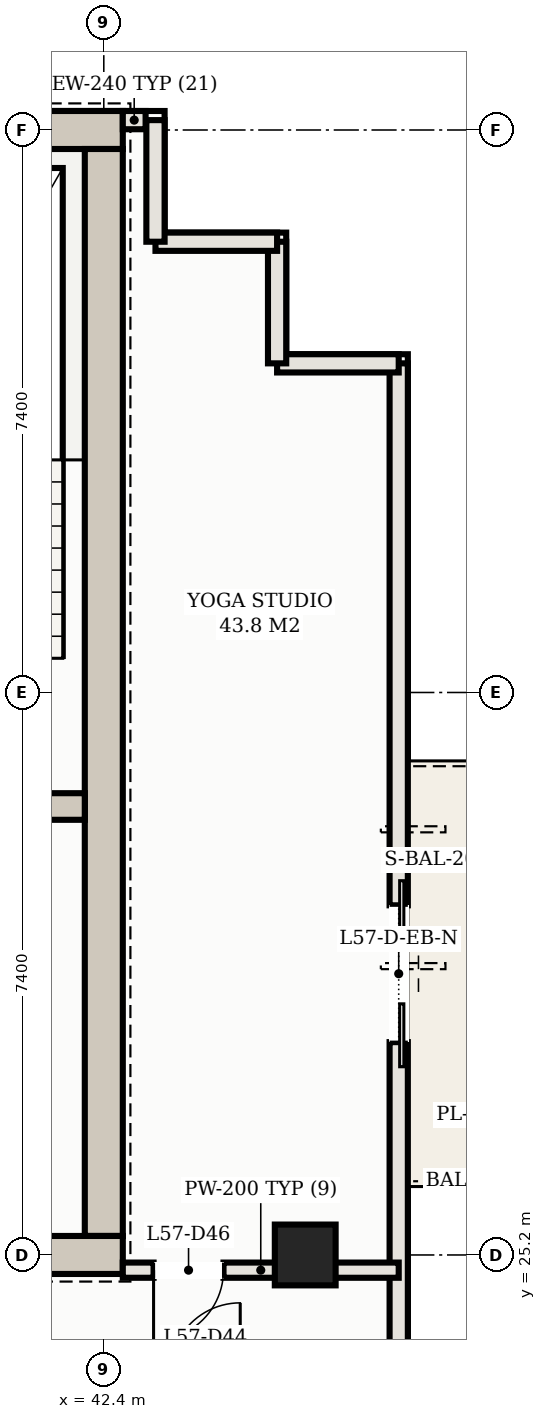
"""IFC4 building model, lengths in metres.
Left out: names, types, materials, properties, quantities, classifications, styles, units other than length and angle.
Written with IfcOpenShell. Run it as: python <this file> out.ifc"""

import sys

from ifc_helpers import new_model, si_unit, direction, frame, frame_2d, origin, origin_2d, place, context, subcontext, project, spatial, rectangle, hollow_rectangle, extrude, element, fill, save


model = new_model("IFC4")
c1 = context("Model", 3, precision=1e-05, world=origin(), true_north=direction((0.0, 1.0)))
c2 = subcontext(c1, "Body", "Model", "MODEL_VIEW")
j1 = project(units=[si_unit("LENGTHUNIT", "METRE"), si_unit("PLANEANGLEUNIT", "RADIAN")], contexts=[c1])
p1 = place(None, origin())
s1 = spatial("IfcSite", under=j1, at=p1, CompositionType="ELEMENT")
p2 = place(p1, origin())
s2 = spatial("IfcBuilding", under=s1, at=p2, CompositionType="ELEMENT")
p3 = place(p2, frame((0.0, 0.0, 209.9)))
s3 = spatial("IfcBuildingStorey", under=s2, at=p3, CompositionType="ELEMENT", Elevation=209.9)
p4 = place(p3, frame((10.35, 40.0, 0.0), z_axis=(0.0, 0.0, 1.0), x_axis=(1.0, 0.0, 0.0)))
e1 = element("IfcWall", 1, at=p4, inside=s3, PredefinedType="SHEAR", context=c2, shape_type="SweptSolid", body=[
    extrude(rectangle(XDim=32.3, YDim=0.5, at=frame_2d((16.15, 0.0))), origin(), (0.0, 0.0, 1.0), 3.11),
])
p5 = place(p3, frame((42.4, 25.45, 0.0), z_axis=(0.0, 0.0, 1.0), x_axis=(0.0, 1.0, 0.0)))
e2 = element("IfcWall", 2, at=p5, inside=s3, PredefinedType="SHEAR", context=c2, shape_type="SweptSolid", body=[
    extrude(rectangle(XDim=14.3, YDim=0.5, at=frame_2d((7.15, 0.0))), origin(), (0.0, 0.0, 1.0), 3.11),
])
p6 = place(p3, frame((34.6, 25.2, 0.0), z_axis=(0.0, 0.0, 1.0), x_axis=(1.0, 0.0, 0.0)))
e3 = element("IfcWall", 3, at=p6, inside=s3, PredefinedType="SHEAR", context=c2, shape_type="SweptSolid", body=[
    extrude(rectangle(XDim=8.05, YDim=0.5, at=frame_2d((4.025, 0.0))), origin(), (0.0, 0.0, 1.0), 3.11),
])
p7 = place(p6, frame((0.65, 0.0, 0.0)))
e4 = element("IfcOpeningElement", 4, at=p7, cuts=e3, PredefinedType="OPENING", context=c2, shape_type="SweptSolid", body=[
    extrude(rectangle(XDim=1.25, YDim=2.2, at=frame_2d((0.625, 1.1))), frame((0.0, 0.26, 0.0), z_axis=(0.0, -1.0, 0.0), x_axis=(1.0, 0.0, 0.0)), (0.0, 0.0, 1.0), 0.52),
])
p8 = place(p3, frame((38.075, 31.1, 0.0), z_axis=(0.0, 0.0, 1.0), x_axis=(1.0, 0.0, 0.0)))
e5 = element("IfcWall", 5, at=p8, inside=s3, PredefinedType="SHEAR", context=c2, shape_type="SweptSolid", body=[
    extrude(rectangle(XDim=4.075, YDim=0.35, at=frame_2d((2.038, 0.0))), origin(), (0.0, 0.0, 1.0), 3.11),
])
p9 = place(p3, frame((45.05, 25.2, 0.0), z_axis=(0.0, 0.0, 1.0), x_axis=(1.0, 0.0, 0.0)))
e6 = element("IfcColumn", 6, at=p9, inside=s3, PredefinedType="COLUMN", context=c2, shape_type="SweptSolid", body=[
    extrude(hollow_rectangle(XDim=0.8, YDim=0.8, WallThickness=0.028, at=origin_2d()), origin(), (0.0, 0.0, 1.0), 3.3),
])
p10 = place(p3, frame((46.28, 10.52, 0.0), z_axis=(0.0, 0.0, 1.0), x_axis=(0.0, 1.0, 0.0)))
e7 = element("IfcWall", 7, at=p10, inside=s3, PredefinedType="SOLIDWALL", context=c2, shape_type="SweptSolid", body=[
    extrude(rectangle(XDim=26.41, YDim=0.24, at=frame_2d((13.205, 0.0))), origin(), (0.0, 0.0, 1.0), 3.11),
])
p11 = place(p10, frame((17.48, 0.0, 0.0)))
e8 = element("IfcOpeningElement", 8, at=p11, cuts=e7, PredefinedType="OPENING", context=c2, shape_type="SweptSolid", body=[
    extrude(rectangle(XDim=1.8, YDim=2.2, at=frame_2d((0.9, 1.1))), frame((0.0, 0.13, 0.0), z_axis=(0.0, -1.0, 0.0), x_axis=(1.0, 0.0, 0.0)), (0.0, 0.0, 1.0), 0.26),
])
for number, where, z_axis, x_axis in (
    (9, (46.28, 36.93, 0.0), (0.0, 0.0, 1.0), (-1.0, 0.0, 0.0)),
    (10, (44.68, 36.93, 0.0), (0.0, 0.0, 1.0), (0.0, 1.0, 0.0)),
):
    element("IfcWall", number, at=place(p3, frame(where, z_axis=z_axis, x_axis=x_axis)), inside=s3, PredefinedType="SOLIDWALL", context=c2, shape_type="SweptSolid", body=[
        extrude(rectangle(XDim=1.6, YDim=0.24, at=frame_2d((0.8, 0.0))), origin(), (0.0, 0.0, 1.0), 3.11),
    ])
for number, where, z_axis, x_axis in (
    (11, (44.68, 38.53, 0.0), (0.0, 0.0, 1.0), (-1.0, 0.0, 0.0)),
    (12, (43.08, 38.53, 0.0), (0.0, 0.0, 1.0), (0.0, 1.0, 0.0)),
):
    element("IfcWall", number, at=place(p3, frame(where, z_axis=z_axis, x_axis=x_axis)), inside=s3, PredefinedType="SOLIDWALL", context=c2, shape_type="SweptSolid", body=[
        extrude(rectangle(XDim=1.6, YDim=0.24, at=frame_2d((0.8, 0.0))), origin(), (0.0, 0.0, 1.0), 3.11),
    ])
p12 = place(p3, frame((42.95, 40.13, 0.0), z_axis=(0.0, 0.0, 1.0), x_axis=(-1.0, 0.0, 0.0)))
e13 = element("IfcWall", 13, at=p12, inside=s3, PredefinedType="SOLIDWALL", context=c2, shape_type="SweptSolid", body=[
    extrude(rectangle(XDim=0.3, YDim=0.24, at=frame_2d((0.15, 0.0))), origin(), (0.0, 0.0, 1.0), 3.11),
])
p13 = place(p3, frame((42.65, 25.0, 0.0), z_axis=(0.0, 0.0, 1.0), x_axis=(1.0, 0.0, 0.0)))
e14 = element("IfcWall", 14, at=p13, inside=s3, PredefinedType="PARTITIONING", context=c2, shape_type="SweptSolid", body=[
    extrude(rectangle(XDim=3.63, YDim=0.2, at=frame_2d((1.815, 0.0))), origin(), (0.0, 0.0, 1.0), 2.43),
])
p14 = place(p13, frame((0.405, 0.0, 0.0)))
e15 = element("IfcOpeningElement", 15, at=p14, cuts=e14, PredefinedType="OPENING", context=c2, shape_type="SweptSolid", body=[
    extrude(rectangle(XDim=0.92, YDim=2.15, at=frame_2d((0.46, 1.075))), frame((0.0, 0.11, 0.0), z_axis=(0.0, -1.0, 0.0), x_axis=(1.0, 0.0, 0.0)), (0.0, 0.0, 1.0), 0.22),
])
p15 = place(p11, frame((1.8, 0.0, 0.0), z_axis=(0.0, 0.0, 1.0), x_axis=(-1.0, 0.0, 0.0)))
e16 = element("IfcDoor", 16, at=p15, inside=s3, OperationType="DOUBLE_DOOR_SLIDING", PredefinedType="DOOR", context=c2, shape_type="SweptSolid", body=[
    extrude(rectangle(XDim=1.8, YDim=2.2, at=frame_2d((0.9, 1.1))), frame((0.0, 0.025, 0.0), z_axis=(0.0, -1.0, 0.0), x_axis=(1.0, 0.0, 0.0)), (0.0, 0.0, 1.0), 0.05),
])
fill(e8, e16)
p16 = place(p14, frame((0.92, 0.0, 0.0), z_axis=(0.0, 0.0, 1.0), x_axis=(-1.0, 0.0, 0.0)))
e17 = element("IfcDoor", 17, at=p16, inside=s3, OperationType="SINGLE_SWING_RIGHT", PredefinedType="DOOR", context=c2, shape_type="SweptSolid", body=[
    extrude(rectangle(XDim=0.92, YDim=2.15, at=frame_2d((0.46, 1.075))), frame((0.0, 0.025, 0.0), z_axis=(0.0, -1.0, 0.0), x_axis=(1.0, 0.0, 0.0)), (0.0, 0.0, 1.0), 0.05),
])
fill(e15, e17)
save(model, sys.argv[1])
